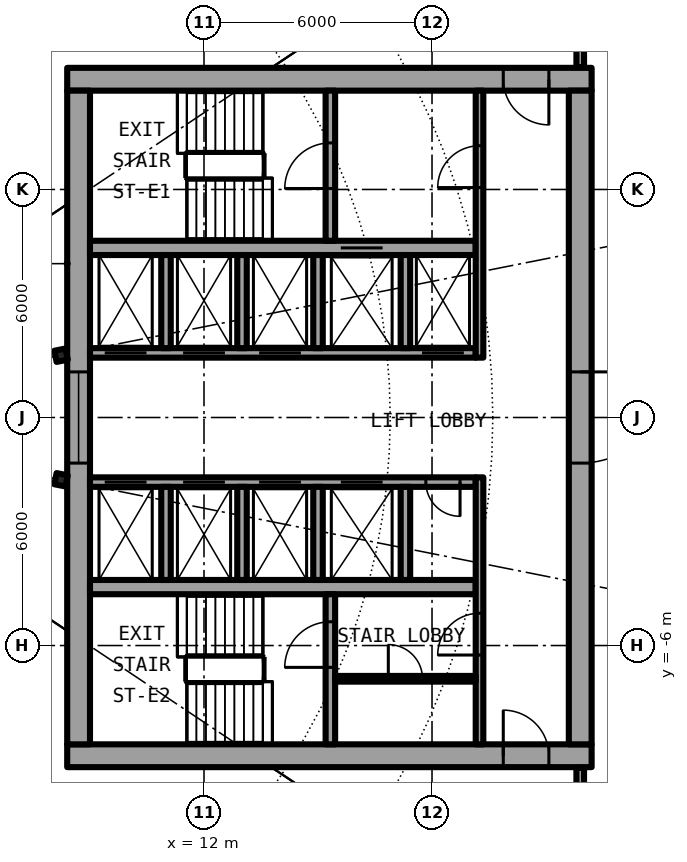
"""IFC4 building model, lengths in metres.
Left out: names, types, materials, properties, quantities, classifications, styles, units other than length and angle.
Written with IfcOpenShell. Run it as: python <this file> out.ifc"""

import sys

from ifc_helpers import new_model, si_unit, direction, frame, frame_2d, origin, origin_2d, place, context, subcontext, project, spatial, rectangle, i_section, extrude, element, fill, save


model = new_model("IFC4")
c1 = context("Model", 3, precision=1e-05, world=origin(), true_north=direction((0.0, 1.0)))
c2 = subcontext(c1, "Body", "Model", "MODEL_VIEW")
j1 = project(units=[si_unit("LENGTHUNIT", "METRE"), si_unit("PLANEANGLEUNIT", "RADIAN")], contexts=[c1])
p1 = place(None, origin())
s1 = spatial("IfcSite", under=j1, at=p1, CompositionType="ELEMENT")
p2 = place(p1, origin())
s2 = spatial("IfcBuilding", under=s1, at=p2, CompositionType="ELEMENT")
p3 = place(p2, frame((0.0, 0.0, 139.1)))
s3 = spatial("IfcBuildingStorey", under=s2, at=p3, CompositionType="ELEMENT", Elevation=139.1)
for number, where, z_axis, x_axis in (
    (1, (8.239, 1.639, 0.0), (0.0, 0.0, 1.0), (0.981, 0.195, 0.0)),
    (2, (8.239, -1.639, 0.0), (0.0, 0.0, 1.0), (0.981, -0.195, 0.0)),
):
    element("IfcColumn", number, at=place(p3, frame(where, z_axis=z_axis, x_axis=x_axis)), inside=s3, PredefinedType="COLUMN", context=c2, shape_type="SweptSolid", body=[
        extrude(i_section(OverallWidth=0.3, OverallDepth=0.3, WebThickness=0.011, FlangeThickness=0.019, FilletRadius=0.027, at=origin_2d()), origin(), (0.0, 0.0, 1.0), 6.1),
    ])
p4 = place(p3, frame((22.2, 8.9, 0.0), z_axis=(0.0, 0.0, 1.0), x_axis=(-1.0, 0.0, 0.0)))
e3 = element("IfcWall", 3, at=p4, inside=s3, PredefinedType="SHEAR", context=c2, shape_type="SweptSolid", body=[
    extrude(rectangle(XDim=13.8, YDim=0.6, at=frame_2d((6.9, 0.0))), origin(), (0.0, 0.0, 1.0), 6.1),
])
p5 = place(p4, frame((1.125, 0.0, 0.0)))
e4 = element("IfcOpeningElement", 4, at=p5, cuts=e3, PredefinedType="OPENING", context=c2, shape_type="SweptSolid", body=[
    extrude(rectangle(XDim=1.2, YDim=2.3, at=frame_2d((0.6, 1.15))), frame((0.0, 0.31, 0.0), z_axis=(0.0, -1.0, 0.0), x_axis=(1.0, 0.0, 0.0)), (0.0, 0.0, 1.0), 0.62),
])
p6 = place(p3, frame((8.4, -8.9, 0.0), z_axis=(0.0, 0.0, 1.0), x_axis=(1.0, 0.0, 0.0)))
e5 = element("IfcWall", 5, at=p6, inside=s3, PredefinedType="SHEAR", context=c2, shape_type="SweptSolid", body=[
    extrude(rectangle(XDim=13.8, YDim=0.6, at=frame_2d((6.9, 0.0))), origin(), (0.0, 0.0, 1.0), 6.1),
])
p7 = place(p6, frame((11.475, 0.0, 0.0)))
e6 = element("IfcOpeningElement", 6, at=p7, cuts=e5, PredefinedType="OPENING", context=c2, shape_type="SweptSolid", body=[
    extrude(rectangle(XDim=1.2, YDim=2.3, at=frame_2d((0.6, 1.15))), frame((0.0, 0.31, 0.0), z_axis=(0.0, -1.0, 0.0), x_axis=(1.0, 0.0, 0.0)), (0.0, 0.0, 1.0), 0.62),
])
p8 = place(p3, frame((21.9, 8.6, 0.0), z_axis=(0.0, 0.0, 1.0), x_axis=(0.0, -1.0, 0.0)))
e7 = element("IfcWall", 7, at=p8, inside=s3, PredefinedType="SHEAR", context=c2, shape_type="SweptSolid", body=[
    extrude(rectangle(XDim=17.2, YDim=0.6, at=frame_2d((8.6, 0.0))), origin(), (0.0, 0.0, 1.0), 6.1),
])
p9 = place(p8, frame((7.4, 0.0, 0.0)))
e8 = element("IfcOpeningElement", 8, at=p9, cuts=e7, PredefinedType="OPENING", context=c2, shape_type="SweptSolid", body=[
    extrude(rectangle(XDim=2.4, YDim=2.3, at=frame_2d((1.2, 1.15))), frame((0.0, 0.31, 0.0), z_axis=(0.0, -1.0, 0.0), x_axis=(1.0, 0.0, 0.0)), (0.0, 0.0, 1.0), 0.62),
])
p10 = place(p3, frame((8.7, -8.6, 0.0), z_axis=(0.0, 0.0, 1.0), x_axis=(0.0, 1.0, 0.0)))
e9 = element("IfcWall", 9, at=p10, inside=s3, PredefinedType="SHEAR", context=c2, shape_type="SweptSolid", body=[
    extrude(rectangle(XDim=17.2, YDim=0.6, at=frame_2d((8.6, 0.0))), origin(), (0.0, 0.0, 1.0), 6.1),
])
p11 = place(p10, frame((7.4, 0.0, 0.1)))
e10 = element("IfcOpeningElement", 10, at=p11, cuts=e9, PredefinedType="OPENING", context=c2, shape_type="SweptSolid", body=[
    extrude(rectangle(XDim=2.4, YDim=2.2, at=frame_2d((1.2, 1.1))), frame((0.0, 0.31, 0.0), z_axis=(0.0, -1.0, 0.0), x_axis=(1.0, 0.0, 0.0)), (0.0, 0.0, 1.0), 0.62),
])
p12 = place(p3, frame((9.0, 1.7, 0.0), z_axis=(0.0, 0.0, 1.0), x_axis=(1.0, 0.0, 0.0)))
e11 = element("IfcWall", 11, at=p12, inside=s3, PredefinedType="SHEAR", context=c2, shape_type="SweptSolid", body=[
    extrude(rectangle(XDim=10.15, YDim=0.25, at=frame_2d((5.075, 0.0))), origin(), (0.0, 0.0, 1.0), 6.1),
])
p13 = place(p12, frame((0.387, 0.0, 0.0)))
e12 = element("IfcOpeningElement", 12, at=p13, cuts=e11, PredefinedType="OPENING", context=c2, shape_type="SweptSolid", body=[
    extrude(rectangle(XDim=1.1, YDim=2.3, at=frame_2d((0.55, 1.15))), frame((0.0, 0.135, 0.0), z_axis=(0.0, -1.0, 0.0), x_axis=(1.0, 0.0, 0.0)), (0.0, 0.0, 1.0), 0.27),
])
p14 = place(p12, frame((2.45, 0.0, 0.0)))
e13 = element("IfcOpeningElement", 13, at=p14, cuts=e11, PredefinedType="OPENING", context=c2, shape_type="SweptSolid", body=[
    extrude(rectangle(XDim=1.1, YDim=2.3, at=frame_2d((0.55, 1.15))), frame((0.0, 0.135, 0.0), z_axis=(0.0, -1.0, 0.0), x_axis=(1.0, 0.0, 0.0)), (0.0, 0.0, 1.0), 0.27),
])
p15 = place(p12, frame((4.45, 0.0, 0.0)))
e14 = element("IfcOpeningElement", 14, at=p15, cuts=e11, PredefinedType="OPENING", context=c2, shape_type="SweptSolid", body=[
    extrude(rectangle(XDim=1.1, YDim=2.3, at=frame_2d((0.55, 1.15))), frame((0.0, 0.135, 0.0), z_axis=(0.0, -1.0, 0.0), x_axis=(1.0, 0.0, 0.0)), (0.0, 0.0, 1.0), 0.27),
])
p16 = place(p12, frame((8.738, 0.0, 0.0)))
e15 = element("IfcOpeningElement", 15, at=p16, cuts=e11, PredefinedType="OPENING", context=c2, shape_type="SweptSolid", body=[
    extrude(rectangle(XDim=1.1, YDim=2.3, at=frame_2d((0.55, 1.15))), frame((0.0, 0.135, 0.0), z_axis=(0.0, -1.0, 0.0), x_axis=(1.0, 0.0, 0.0)), (0.0, 0.0, 1.0), 0.27),
])
p17 = place(p3, frame((9.0, 4.462, 0.0), z_axis=(0.0, 0.0, 1.0), x_axis=(1.0, 0.0, 0.0)))
e16 = element("IfcWall", 16, at=p17, inside=s3, PredefinedType="SHEAR", context=c2, shape_type="SweptSolid", body=[
    extrude(rectangle(XDim=10.15, YDim=0.375, at=frame_2d((5.075, 0.0))), origin(), (0.0, 0.0, 1.0), 6.1),
])
p18 = place(p17, frame((6.6, 0.0, 0.0)))
e17 = element("IfcOpeningElement", 17, at=p18, cuts=e16, PredefinedType="OPENING", context=c2, shape_type="SweptSolid", body=[
    extrude(rectangle(XDim=1.1, YDim=2.3, at=frame_2d((0.55, 1.15))), frame((0.0, 0.198, 0.0), z_axis=(0.0, -1.0, 0.0), x_axis=(1.0, 0.0, 0.0)), (0.0, 0.0, 1.0), 0.395),
])
p19 = place(p3, frame((15.325, 4.65, 0.0), z_axis=(0.0, 0.0, 1.0), x_axis=(0.0, 1.0, 0.0)))
e18 = element("IfcWall", 18, at=p19, inside=s3, PredefinedType="SHEAR", context=c2, shape_type="SweptSolid", body=[
    extrude(rectangle(XDim=3.95, YDim=0.25, at=frame_2d((1.975, 0.0))), origin(), (0.0, 0.0, 1.0), 6.1),
])
p20 = place(p19, frame((1.375, 0.0, 0.0)))
e19 = element("IfcOpeningElement", 19, at=p20, cuts=e18, PredefinedType="OPENING", context=c2, shape_type="SweptSolid", body=[
    extrude(rectangle(XDim=1.2, YDim=2.3, at=frame_2d((0.6, 1.15))), frame((0.0, 0.135, 0.0), z_axis=(0.0, -1.0, 0.0), x_axis=(1.0, 0.0, 0.0)), (0.0, 0.0, 1.0), 0.27),
])
for number, where, z_axis, x_axis in (
    (20, (15.0, 1.825, 0.0), (0.0, 0.0, 1.0), (0.0, 1.0, 0.0)),
    (21, (17.3, 1.825, 0.0), (0.0, 0.0, 1.0), (0.0, 1.0, 0.0)),
):
    element("IfcWall", number, at=place(p3, frame(where, z_axis=z_axis, x_axis=x_axis)), inside=s3, PredefinedType="SOLIDWALL", context=c2, shape_type="SweptSolid", body=[
        extrude(rectangle(XDim=2.45, YDim=0.25, at=frame_2d((1.225, 0.0))), origin(), (0.0, 0.0, 1.0), 5.75),
    ])
p21 = place(p3, frame((19.25, 1.575, 0.0), z_axis=(0.0, 0.0, 1.0), x_axis=(0.0, 1.0, 0.0)))
e22 = element("IfcWall", 22, at=p21, inside=s3, PredefinedType="SOLIDWALL", context=c2, shape_type="SweptSolid", body=[
    extrude(rectangle(XDim=7.025, YDim=0.2, at=frame_2d((3.513, 0.0))), origin(), (0.0, 0.0, 1.0), 5.75),
])
p22 = place(p21, frame((4.475, 0.0, 0.0)))
e23 = element("IfcOpeningElement", 23, at=p22, cuts=e22, PredefinedType="OPENING", context=c2, shape_type="SweptSolid", body=[
    extrude(rectangle(XDim=1.1, YDim=2.3, at=frame_2d((0.55, 1.15))), frame((0.0, 0.11, 0.0), z_axis=(0.0, -1.0, 0.0), x_axis=(1.0, 0.0, 0.0)), (0.0, 0.0, 1.0), 0.22),
])
p23 = place(p3, frame((19.15, -1.7, 0.0), z_axis=(0.0, 0.0, 1.0), x_axis=(-1.0, 0.0, 0.0)))
e24 = element("IfcWall", 24, at=p23, inside=s3, PredefinedType="SHEAR", context=c2, shape_type="SweptSolid", body=[
    extrude(rectangle(XDim=10.15, YDim=0.25, at=frame_2d((5.075, 0.0))), origin(), (0.0, 0.0, 1.0), 6.1),
])
p24 = place(p23, frame((8.663, 0.0, 0.0)))
e25 = element("IfcOpeningElement", 25, at=p24, cuts=e24, PredefinedType="OPENING", context=c2, shape_type="SweptSolid", body=[
    extrude(rectangle(XDim=1.1, YDim=2.3, at=frame_2d((0.55, 1.15))), frame((0.0, 0.135, 0.0), z_axis=(0.0, -1.0, 0.0), x_axis=(1.0, 0.0, 0.0)), (0.0, 0.0, 1.0), 0.27),
])
p25 = place(p23, frame((6.6, 0.0, 0.0)))
e26 = element("IfcOpeningElement", 26, at=p25, cuts=e24, PredefinedType="OPENING", context=c2, shape_type="SweptSolid", body=[
    extrude(rectangle(XDim=1.1, YDim=2.3, at=frame_2d((0.55, 1.15))), frame((0.0, 0.135, 0.0), z_axis=(0.0, -1.0, 0.0), x_axis=(1.0, 0.0, 0.0)), (0.0, 0.0, 1.0), 0.27),
])
p26 = place(p23, frame((4.6, 0.0, 0.0)))
e27 = element("IfcOpeningElement", 27, at=p26, cuts=e24, PredefinedType="OPENING", context=c2, shape_type="SweptSolid", body=[
    extrude(rectangle(XDim=1.1, YDim=2.3, at=frame_2d((0.55, 1.15))), frame((0.0, 0.135, 0.0), z_axis=(0.0, -1.0, 0.0), x_axis=(1.0, 0.0, 0.0)), (0.0, 0.0, 1.0), 0.27),
])
p27 = place(p23, frame((2.45, 0.0, 0.0)))
e28 = element("IfcOpeningElement", 28, at=p27, cuts=e24, PredefinedType="OPENING", context=c2, shape_type="SweptSolid", body=[
    extrude(rectangle(XDim=1.1, YDim=2.3, at=frame_2d((0.55, 1.15))), frame((0.0, 0.135, 0.0), z_axis=(0.0, -1.0, 0.0), x_axis=(1.0, 0.0, 0.0)), (0.0, 0.0, 1.0), 0.27),
])
p28 = place(p23, frame((0.413, 0.0, 0.0)))
e29 = element("IfcOpeningElement", 29, at=p28, cuts=e24, PredefinedType="OPENING", context=c2, shape_type="SweptSolid", body=[
    extrude(rectangle(XDim=0.9, YDim=2.3, at=frame_2d((0.45, 1.15))), frame((0.0, 0.135, 0.0), z_axis=(0.0, -1.0, 0.0), x_axis=(1.0, 0.0, 0.0)), (0.0, 0.0, 1.0), 0.27),
])
p29 = place(p3, frame((9.0, -4.462, 0.0), z_axis=(0.0, 0.0, 1.0), x_axis=(1.0, 0.0, 0.0)))
e30 = element("IfcWall", 30, at=p29, inside=s3, PredefinedType="SHEAR", context=c2, shape_type="SweptSolid", body=[
    extrude(rectangle(XDim=10.15, YDim=0.375, at=frame_2d((5.075, 0.0))), origin(), (0.0, 0.0, 1.0), 6.1),
])
p30 = place(p3, frame((15.325, -8.6, 0.0), z_axis=(0.0, 0.0, 1.0), x_axis=(0.0, 1.0, 0.0)))
e31 = element("IfcWall", 31, at=p30, inside=s3, PredefinedType="SHEAR", context=c2, shape_type="SweptSolid", body=[
    extrude(rectangle(XDim=3.95, YDim=0.25, at=frame_2d((1.975, 0.0))), origin(), (0.0, 0.0, 1.0), 6.1),
])
p31 = place(p30, frame((2.025, 0.0, 0.0)))
e32 = element("IfcOpeningElement", 32, at=p31, cuts=e31, PredefinedType="OPENING", context=c2, shape_type="SweptSolid", body=[
    extrude(rectangle(XDim=1.2, YDim=2.3, at=frame_2d((0.6, 1.15))), frame((0.0, 0.135, 0.0), z_axis=(0.0, -1.0, 0.0), x_axis=(1.0, 0.0, 0.0)), (0.0, 0.0, 1.0), 0.27),
])
for number, where, z_axis, x_axis in (
    (33, (15.0, -1.825, 0.0), (0.0, 0.0, 1.0), (0.0, -1.0, 0.0)),
    (34, (17.3, -1.825, 0.0), (0.0, 0.0, 1.0), (0.0, -1.0, 0.0)),
):
    element("IfcWall", number, at=place(p3, frame(where, z_axis=z_axis, x_axis=x_axis)), inside=s3, PredefinedType="SOLIDWALL", context=c2, shape_type="SweptSolid", body=[
        extrude(rectangle(XDim=2.45, YDim=0.25, at=frame_2d((1.225, 0.0))), origin(), (0.0, 0.0, 1.0), 5.75),
    ])
p32 = place(p3, frame((19.25, -8.6, 0.0), z_axis=(0.0, 0.0, 1.0), x_axis=(0.0, 1.0, 0.0)))
e35 = element("IfcWall", 35, at=p32, inside=s3, PredefinedType="SOLIDWALL", context=c2, shape_type="SweptSolid", body=[
    extrude(rectangle(XDim=7.025, YDim=0.2, at=frame_2d((3.513, 0.0))), origin(), (0.0, 0.0, 1.0), 5.75),
])
p33 = place(p32, frame((2.35, 0.0, 0.0)))
e36 = element("IfcOpeningElement", 36, at=p33, cuts=e35, PredefinedType="OPENING", context=c2, shape_type="SweptSolid", body=[
    extrude(rectangle(XDim=1.1, YDim=2.3, at=frame_2d((0.55, 1.15))), frame((0.0, 0.11, 0.0), z_axis=(0.0, -1.0, 0.0), x_axis=(1.0, 0.0, 0.0)), (0.0, 0.0, 1.0), 0.22),
])
for number, where, z_axis, x_axis in (
    (37, (11.0, 1.825, 0.0), (0.0, 0.0, 1.0), (0.0, 1.0, 0.0)),
    (38, (13.0, 1.825, 0.0), (0.0, 0.0, 1.0), (0.0, 1.0, 0.0)),
    (39, (11.0, -1.825, 0.0), (0.0, 0.0, 1.0), (0.0, -1.0, 0.0)),
    (40, (13.0, -1.825, 0.0), (0.0, 0.0, 1.0), (0.0, -1.0, 0.0)),
):
    element("IfcWall", number, at=place(p3, frame(where, z_axis=z_axis, x_axis=x_axis)), inside=s3, PredefinedType="SOLIDWALL", context=c2, shape_type="SweptSolid", body=[
        extrude(rectangle(XDim=2.45, YDim=0.25, at=frame_2d((1.225, 0.0))), origin(), (0.0, 0.0, 1.0), 5.75),
    ])
p34 = place(p3, frame((15.45, -6.875, 0.0), z_axis=(0.0, 0.0, 1.0), x_axis=(1.0, 0.0, 0.0)))
e41 = element("IfcWall", 41, at=p34, inside=s3, PredefinedType="PARTITIONING", context=c2, shape_type="SweptSolid", body=[
    extrude(rectangle(XDim=3.7, YDim=0.15, at=frame_2d((1.85, 0.0))), origin(), (0.0, 0.0, 1.0), 5.75),
])
p35 = place(p34, frame((1.4, 0.0, 0.0)))
e42 = element("IfcOpeningElement", 42, at=p35, cuts=e41, PredefinedType="OPENING", context=c2, shape_type="SweptSolid", body=[
    extrude(rectangle(XDim=0.9, YDim=2.3, at=frame_2d((0.45, 1.15))), frame((0.0, 0.085, 0.0), z_axis=(0.0, -1.0, 0.0), x_axis=(1.0, 0.0, 0.0)), (0.0, 0.0, 1.0), 0.17),
])
for number, where, z_axis, x_axis in (
    (43, (21.9, -12.62, 0.0), (0.0, 0.0, 1.0), (0.0, 1.0, 0.0)),
    (44, (21.9, 9.22, 0.0), (0.0, 0.0, 1.0), (0.0, 1.0, 0.0)),
):
    element("IfcWall", number, at=place(p3, frame(where, z_axis=z_axis, x_axis=x_axis)), inside=s3, PredefinedType="PARTITIONING", context=c2, shape_type="SweptSolid", body=[
        extrude(rectangle(XDim=3.4, YDim=0.2, at=frame_2d((1.7, 0.0))), origin(), (0.0, 0.0, 1.0), 5.75),
    ])
p36 = place(p3, frame((2.837, -9.352, 0.0), z_axis=(0.0, 0.0, 1.0), x_axis=(0.290276626732, -0.956942777794, 0.0)))
e45 = element("IfcWall", 45, at=p36, inside=s3, PredefinedType="PARTITIONING", context=c2, shape_type="SweptSolid", body=[
    extrude(rectangle(XDim=17.566, YDim=0.2, at=frame_2d((8.783, 0.0))), origin(), (0.0, 0.0, 1.0), 5.75),
])
p37 = place(p13, origin())
e46 = element("IfcDoor", 46, at=p37, inside=s3, OperationType="DOUBLE_DOOR_SLIDING", PredefinedType="DOOR", context=c2, shape_type="SweptSolid", body=[
    extrude(rectangle(XDim=1.1, YDim=2.3, at=frame_2d((0.55, 1.15))), frame((0.0, 0.025, 0.0), z_axis=(0.0, -1.0, 0.0), x_axis=(1.0, 0.0, 0.0)), (0.0, 0.0, 1.0), 0.05),
])
fill(e12, e46)
p38 = place(p14, origin())
e47 = element("IfcDoor", 47, at=p38, inside=s3, OperationType="DOUBLE_DOOR_SLIDING", PredefinedType="DOOR", context=c2, shape_type="SweptSolid", body=[
    extrude(rectangle(XDim=1.1, YDim=2.3, at=frame_2d((0.55, 1.15))), frame((0.0, 0.025, 0.0), z_axis=(0.0, -1.0, 0.0), x_axis=(1.0, 0.0, 0.0)), (0.0, 0.0, 1.0), 0.05),
])
fill(e13, e47)
p39 = place(p15, origin())
e48 = element("IfcDoor", 48, at=p39, inside=s3, OperationType="DOUBLE_DOOR_SLIDING", PredefinedType="DOOR", context=c2, shape_type="SweptSolid", body=[
    extrude(rectangle(XDim=1.1, YDim=2.3, at=frame_2d((0.55, 1.15))), frame((0.0, 0.025, 0.0), z_axis=(0.0, -1.0, 0.0), x_axis=(1.0, 0.0, 0.0)), (0.0, 0.0, 1.0), 0.05),
])
fill(e14, e48)
p40 = place(p18, origin())
e49 = element("IfcDoor", 49, at=p40, inside=s3, OperationType="DOUBLE_DOOR_SLIDING", PredefinedType="DOOR", context=c2, shape_type="SweptSolid", body=[
    extrude(rectangle(XDim=1.1, YDim=2.3, at=frame_2d((0.55, 1.15))), frame((0.0, 0.025, 0.0), z_axis=(0.0, -1.0, 0.0), x_axis=(1.0, 0.0, 0.0)), (0.0, 0.0, 1.0), 0.05),
])
fill(e17, e49)
p41 = place(p16, origin())
e50 = element("IfcDoor", 50, at=p41, inside=s3, OperationType="DOUBLE_DOOR_SLIDING", PredefinedType="DOOR", context=c2, shape_type="SweptSolid", body=[
    extrude(rectangle(XDim=1.1, YDim=2.3, at=frame_2d((0.55, 1.15))), frame((0.0, 0.025, 0.0), z_axis=(0.0, -1.0, 0.0), x_axis=(1.0, 0.0, 0.0)), (0.0, 0.0, 1.0), 0.05),
])
fill(e15, e50)
p42 = place(p24, origin())
e51 = element("IfcDoor", 51, at=p42, inside=s3, OperationType="DOUBLE_DOOR_SLIDING", PredefinedType="DOOR", context=c2, shape_type="SweptSolid", body=[
    extrude(rectangle(XDim=1.1, YDim=2.3, at=frame_2d((0.55, 1.15))), frame((0.0, 0.025, 0.0), z_axis=(0.0, -1.0, 0.0), x_axis=(1.0, 0.0, 0.0)), (0.0, 0.0, 1.0), 0.05),
])
fill(e25, e51)
p43 = place(p25, origin())
e52 = element("IfcDoor", 52, at=p43, inside=s3, OperationType="DOUBLE_DOOR_SLIDING", PredefinedType="DOOR", context=c2, shape_type="SweptSolid", body=[
    extrude(rectangle(XDim=1.1, YDim=2.3, at=frame_2d((0.55, 1.15))), frame((0.0, 0.025, 0.0), z_axis=(0.0, -1.0, 0.0), x_axis=(1.0, 0.0, 0.0)), (0.0, 0.0, 1.0), 0.05),
])
fill(e26, e52)
p44 = place(p26, origin())
e53 = element("IfcDoor", 53, at=p44, inside=s3, OperationType="DOUBLE_DOOR_SLIDING", PredefinedType="DOOR", context=c2, shape_type="SweptSolid", body=[
    extrude(rectangle(XDim=1.1, YDim=2.3, at=frame_2d((0.55, 1.15))), frame((0.0, 0.025, 0.0), z_axis=(0.0, -1.0, 0.0), x_axis=(1.0, 0.0, 0.0)), (0.0, 0.0, 1.0), 0.05),
])
fill(e27, e53)
p45 = place(p27, origin())
e54 = element("IfcDoor", 54, at=p45, inside=s3, OperationType="DOUBLE_DOOR_SLIDING", PredefinedType="DOOR", context=c2, shape_type="SweptSolid", body=[
    extrude(rectangle(XDim=1.1, YDim=2.3, at=frame_2d((0.55, 1.15))), frame((0.0, 0.025, 0.0), z_axis=(0.0, -1.0, 0.0), x_axis=(1.0, 0.0, 0.0)), (0.0, 0.0, 1.0), 0.05),
])
fill(e28, e54)
p46 = place(p28, origin())
e55 = element("IfcDoor", 55, at=p46, inside=s3, OperationType="SINGLE_SWING_RIGHT", PredefinedType="DOOR", context=c2, shape_type="SweptSolid", body=[
    extrude(rectangle(XDim=0.9, YDim=2.3, at=frame_2d((0.45, 1.15))), frame((0.0, 0.025, 0.0), z_axis=(0.0, -1.0, 0.0), x_axis=(1.0, 0.0, 0.0)), (0.0, 0.0, 1.0), 0.05),
])
fill(e29, e55)
p47 = place(p35, origin())
e56 = element("IfcDoor", 56, at=p47, inside=s3, OperationType="SINGLE_SWING_LEFT", PredefinedType="DOOR", context=c2, shape_type="SweptSolid", body=[
    extrude(rectangle(XDim=0.9, YDim=2.3, at=frame_2d((0.45, 1.15))), frame((0.0, 0.025, 0.0), z_axis=(0.0, -1.0, 0.0), x_axis=(1.0, 0.0, 0.0)), (0.0, 0.0, 1.0), 0.05),
])
fill(e42, e56)
p48 = place(p20, origin())
e57 = element("IfcDoor", 57, at=p48, inside=s3, OperationType="SINGLE_SWING_LEFT", PredefinedType="DOOR", context=c2, shape_type="SweptSolid", body=[
    extrude(rectangle(XDim=1.2, YDim=2.3, at=frame_2d((0.6, 1.15))), frame((0.0, 0.025, 0.0), z_axis=(0.0, -1.0, 0.0), x_axis=(1.0, 0.0, 0.0)), (0.0, 0.0, 1.0), 0.05),
])
fill(e19, e57)
p49 = place(p31, origin())
e58 = element("IfcDoor", 58, at=p49, inside=s3, OperationType="SINGLE_SWING_LEFT", PredefinedType="DOOR", context=c2, shape_type="SweptSolid", body=[
    extrude(rectangle(XDim=1.2, YDim=2.3, at=frame_2d((0.6, 1.15))), frame((0.0, 0.025, 0.0), z_axis=(0.0, -1.0, 0.0), x_axis=(1.0, 0.0, 0.0)), (0.0, 0.0, 1.0), 0.05),
])
fill(e32, e58)
p50 = place(p22, origin())
e59 = element("IfcDoor", 59, at=p50, inside=s3, OperationType="SINGLE_SWING_LEFT", PredefinedType="DOOR", context=c2, shape_type="SweptSolid", body=[
    extrude(rectangle(XDim=1.1, YDim=2.3, at=frame_2d((0.55, 1.15))), frame((0.0, 0.025, 0.0), z_axis=(0.0, -1.0, 0.0), x_axis=(1.0, 0.0, 0.0)), (0.0, 0.0, 1.0), 0.05),
])
fill(e23, e59)
p51 = place(p33, origin())
e60 = element("IfcDoor", 60, at=p51, inside=s3, OperationType="SINGLE_SWING_RIGHT", PredefinedType="DOOR", context=c2, shape_type="SweptSolid", body=[
    extrude(rectangle(XDim=1.1, YDim=2.3, at=frame_2d((0.55, 1.15))), frame((0.0, 0.025, 0.0), z_axis=(0.0, -1.0, 0.0), x_axis=(1.0, 0.0, 0.0)), (0.0, 0.0, 1.0), 0.05),
])
fill(e36, e60)
p52 = place(p5, origin())
e61 = element("IfcDoor", 61, at=p52, inside=s3, OperationType="SINGLE_SWING_RIGHT", PredefinedType="DOOR", context=c2, shape_type="SweptSolid", body=[
    extrude(rectangle(XDim=1.2, YDim=2.3, at=frame_2d((0.6, 1.15))), frame((0.0, 0.025, 0.0), z_axis=(0.0, -1.0, 0.0), x_axis=(1.0, 0.0, 0.0)), (0.0, 0.0, 1.0), 0.05),
])
fill(e4, e61)
p53 = place(p7, origin())
e62 = element("IfcDoor", 62, at=p53, inside=s3, OperationType="SINGLE_SWING_LEFT", PredefinedType="DOOR", context=c2, shape_type="SweptSolid", body=[
    extrude(rectangle(XDim=1.2, YDim=2.3, at=frame_2d((0.6, 1.15))), frame((0.0, 0.025, 0.0), z_axis=(0.0, -1.0, 0.0), x_axis=(1.0, 0.0, 0.0)), (0.0, 0.0, 1.0), 0.05),
])
fill(e6, e62)
p54 = place(p9, origin())
e63 = element("IfcDoor", 63, at=p54, inside=s3, OperationType="SINGLE_SWING_LEFT", PredefinedType="DOOR", context=c2, shape_type="SweptSolid", body=[
    extrude(rectangle(XDim=2.4, YDim=2.3, at=frame_2d((1.2, 1.15))), frame((0.0, 0.025, 0.0), z_axis=(0.0, -1.0, 0.0), x_axis=(1.0, 0.0, 0.0)), (0.0, 0.0, 1.0), 0.05),
])
fill(e8, e63)
p55 = place(p11, origin())
e64 = element("IfcWindow", 64, at=p55, inside=s3, PartitioningType="SINGLE_PANEL", PredefinedType="WINDOW", context=c2, shape_type="SweptSolid", body=[
    extrude(rectangle(XDim=2.4, YDim=2.2, at=frame_2d((1.2, 1.1))), frame((0.0, 0.03, 0.0), z_axis=(0.0, -1.0, 0.0), x_axis=(1.0, 0.0, 0.0)), (0.0, 0.0, 1.0), 0.06),
])
fill(e10, e64)
save(model, sys.argv[1])
